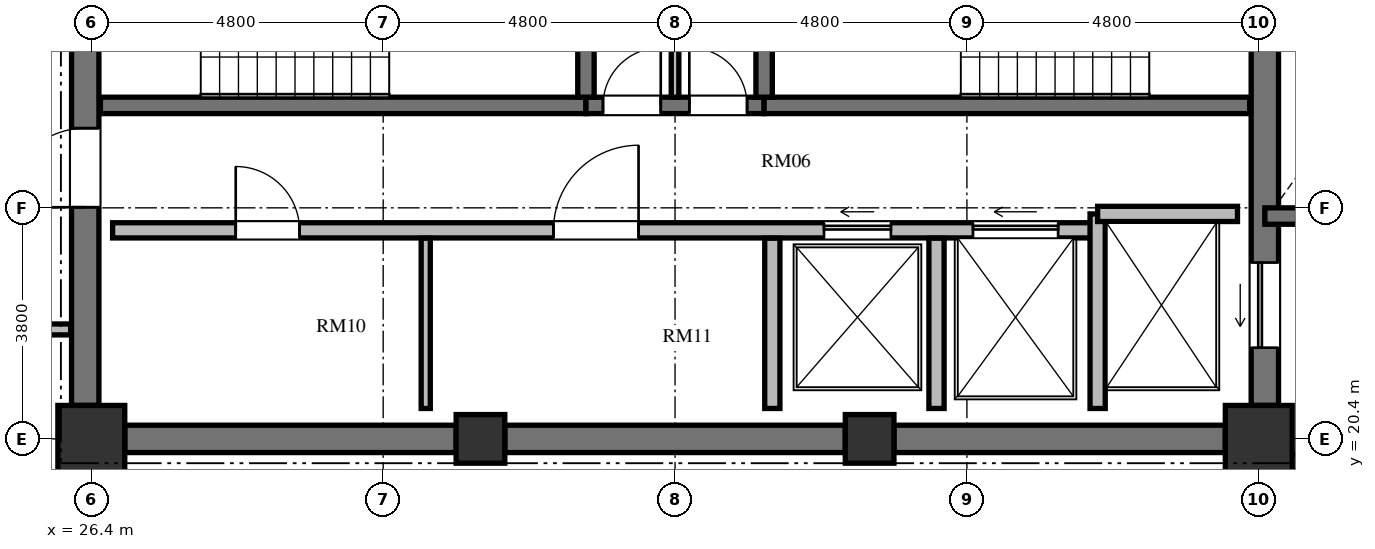
"""IFC4 building model, lengths in metres.
Left out: names, types, materials, properties, quantities, classifications, styles, units other than length and angle.
Written with IfcOpenShell. Run it as: python <this file> out.ifc"""

import sys

from ifc_helpers import new_model, si_unit, direction, frame, frame_2d, origin, origin_2d, place, context, subcontext, project, spatial, rectangle, extrude, element, fill, save


model = new_model("IFC4")
c1 = context("Model", 3, precision=1e-05, world=origin(), true_north=direction((0.0, 1.0)))
c2 = subcontext(c1, "Body", "Model", "MODEL_VIEW")
j1 = project(units=[si_unit("LENGTHUNIT", "METRE"), si_unit("PLANEANGLEUNIT", "RADIAN")], contexts=[c1])
p1 = place(None, origin())
s1 = spatial("IfcSite", under=j1, at=p1, CompositionType="ELEMENT")
p2 = place(p1, origin())
s2 = spatial("IfcBuilding", under=s1, at=p2, CompositionType="ELEMENT")
p3 = place(p2, frame((0.0, 0.0, 284.208)))
s3 = spatial("IfcBuildingStorey", under=s2, at=p3, CompositionType="ELEMENT", Elevation=284.208)
p4 = place(p3, frame((26.4, 20.4, 0.0), z_axis=(0.0, 0.0, 1.0), x_axis=(1.0, 0.0, 0.0)))
e1 = element("IfcColumn", 1, at=p4, inside=s3, PredefinedType="COLUMN", context=c2, shape_type="SweptSolid", body=[
    extrude(rectangle(XDim=1.1, YDim=1.1, at=origin_2d()), origin(), (0.0, 0.0, 1.0), 3.648),
])
for number, where, z_axis, x_axis in (
    (2, (32.8, 20.4, 0.0), (0.0, 0.0, 1.0), (1.0, 0.0, 0.0)),
    (3, (39.2, 20.4, 0.0), (0.0, 0.0, 1.0), (1.0, 0.0, 0.0)),
):
    element("IfcColumn", number, at=place(p3, frame(where, z_axis=z_axis, x_axis=x_axis)), inside=s3, PredefinedType="COLUMN", context=c2, shape_type="SweptSolid", body=[
        extrude(rectangle(XDim=0.8, YDim=0.8, at=origin_2d()), origin(), (0.0, 0.0, 1.0), 3.648),
    ])
p5 = place(p3, frame((45.6, 20.4, 0.0), z_axis=(0.0, 0.0, 1.0), x_axis=(1.0, 0.0, 0.0)))
e4 = element("IfcColumn", 4, at=p5, inside=s3, PredefinedType="COLUMN", context=c2, shape_type="SweptSolid", body=[
    extrude(rectangle(XDim=1.1, YDim=1.1, at=origin_2d()), origin(), (0.0, 0.0, 1.0), 3.648),
])
p6 = place(p3, frame((26.3, 20.95, 0.0), z_axis=(0.0, 0.0, 1.0), x_axis=(0.0, 1.0, 0.0)))
e5 = element("IfcWall", 5, at=p6, inside=s3, PredefinedType="SHEAR", context=c2, shape_type="SweptSolid", body=[
    extrude(rectangle(XDim=14.1, YDim=0.45, at=frame_2d((7.05, 0.0))), origin(), (0.0, 0.0, 1.0), 3.648),
])
p7 = place(p6, frame((6.5, 0.0, 0.0)))
e6 = element("IfcOpeningElement", 6, at=p7, cuts=e5, PredefinedType="OPENING", context=c2, shape_type="SweptSolid", body=[
    extrude(rectangle(XDim=1.2, YDim=2.15, at=frame_2d((0.6, 1.075))), frame((0.0, 0.235, 0.0), z_axis=(0.0, -1.0, 0.0), x_axis=(1.0, 0.0, 0.0)), (0.0, 0.0, 1.0), 0.47),
])
p8 = place(p6, frame((9.6, 0.0, 0.0)))
e7 = element("IfcOpeningElement", 7, at=p8, cuts=e5, PredefinedType="OPENING", context=c2, shape_type="SweptSolid", body=[
    extrude(rectangle(XDim=1.3, YDim=2.2, at=frame_2d((0.65, 1.1))), frame((0.0, 0.235, 0.0), z_axis=(0.0, -1.0, 0.0), x_axis=(1.0, 0.0, 0.0)), (0.0, 0.0, 1.0), 0.47),
])
p9 = place(p6, frame((3.26, 0.0, 0.0)))
e8 = element("IfcOpeningElement", 8, at=p9, cuts=e5, PredefinedType="OPENING", context=c2, shape_type="SweptSolid", body=[
    extrude(rectangle(XDim=1.3, YDim=2.2, at=frame_2d((0.65, 1.1))), frame((0.0, 0.235, 0.0), z_axis=(0.0, -1.0, 0.0), x_axis=(1.0, 0.0, 0.0)), (0.0, 0.0, 1.0), 0.47),
])
p10 = place(p3, frame((45.7, 20.95, 0.0), z_axis=(0.0, 0.0, 1.0), x_axis=(0.0, 1.0, 0.0)))
e9 = element("IfcWall", 9, at=p10, inside=s3, PredefinedType="SHEAR", context=c2, shape_type="SweptSolid", body=[
    extrude(rectangle(XDim=14.1, YDim=0.45, at=frame_2d((7.05, 0.0))), origin(), (0.0, 0.0, 1.0), 3.648),
])
p11 = place(p10, frame((11.75, 0.0, 0.0)))
e10 = element("IfcOpeningElement", 10, at=p11, cuts=e9, PredefinedType="OPENING", context=c2, shape_type="SweptSolid", body=[
    extrude(rectangle(XDim=1.4, YDim=2.3, at=frame_2d((0.7, 1.15))), frame((0.0, 0.235, 0.0), z_axis=(0.0, -1.0, 0.0), x_axis=(1.0, 0.0, 0.0)), (0.0, 0.0, 1.0), 0.47),
])
p12 = place(p10, frame((0.95, 0.0, 0.0)))
e11 = element("IfcOpeningElement", 11, at=p12, cuts=e9, PredefinedType="OPENING", context=c2, shape_type="SweptSolid", body=[
    extrude(rectangle(XDim=1.4, YDim=2.3, at=frame_2d((0.7, 1.15))), frame((0.0, 0.235, 0.0), z_axis=(0.0, -1.0, 0.0), x_axis=(1.0, 0.0, 0.0)), (0.0, 0.0, 1.0), 0.47),
])
p13 = place(p3, frame((26.95, 20.4, 0.0), z_axis=(0.0, 0.0, 1.0), x_axis=(1.0, 0.0, 0.0)))
e12 = element("IfcWall", 12, at=p13, inside=s3, PredefinedType="SHEAR", context=c2, shape_type="SweptSolid", body=[
    extrude(rectangle(XDim=5.45, YDim=0.45, at=frame_2d((2.725, 0.0))), origin(), (0.0, 0.0, 1.0), 3.648),
])
p14 = place(p3, frame((33.2, 20.4, 0.0), z_axis=(0.0, 0.0, 1.0), x_axis=(1.0, 0.0, 0.0)))
e13 = element("IfcWall", 13, at=p14, inside=s3, PredefinedType="SHEAR", context=c2, shape_type="SweptSolid", body=[
    extrude(rectangle(XDim=5.6, YDim=0.45, at=frame_2d((2.8, 0.0))), origin(), (0.0, 0.0, 1.0), 3.648),
])
p15 = place(p3, frame((39.6, 20.4, 0.0), z_axis=(0.0, 0.0, 1.0), x_axis=(1.0, 0.0, 0.0)))
e14 = element("IfcWall", 14, at=p15, inside=s3, PredefinedType="SHEAR", context=c2, shape_type="SweptSolid", body=[
    extrude(rectangle(XDim=5.45, YDim=0.45, at=frame_2d((2.725, 0.0))), origin(), (0.0, 0.0, 1.0), 3.648),
])
p16 = place(p3, frame((26.55, 25.885, 0.0), z_axis=(0.0, 0.0, 1.0), x_axis=(1.0, 0.0, 0.0)))
e15 = element("IfcWall", 15, at=p16, inside=s3, PredefinedType="SHEAR", context=c2, shape_type="SweptSolid", body=[
    extrude(rectangle(XDim=7.985, YDim=0.27, at=frame_2d((3.992, 0.0))), origin(), (0.0, 0.0, 1.0), 3.648),
])
p17 = place(p3, frame((34.535, 25.885, 0.0), z_axis=(0.0, 0.0, 1.0), x_axis=(1.0, 0.0, 0.0)))
e16 = element("IfcWall", 16, at=p17, inside=s3, PredefinedType="SHEAR", context=c2, shape_type="SweptSolid", body=[
    extrude(rectangle(XDim=2.93, YDim=0.27, at=frame_2d((1.465, 0.0))), origin(), (0.0, 0.0, 1.0), 3.648),
])
p18 = place(p17, frame((0.28, 0.0, 0.0)))
e17 = element("IfcOpeningElement", 17, at=p18, cuts=e16, PredefinedType="OPENING", context=c2, shape_type="SweptSolid", body=[
    extrude(rectangle(XDim=0.95, YDim=2.1, at=frame_2d((0.475, 1.05))), frame((0.0, 0.145, 0.0), z_axis=(0.0, -1.0, 0.0), x_axis=(1.0, 0.0, 0.0)), (0.0, 0.0, 1.0), 0.29),
])
p19 = place(p17, frame((1.7, 0.0, 0.0)))
e18 = element("IfcOpeningElement", 18, at=p19, cuts=e16, PredefinedType="OPENING", context=c2, shape_type="SweptSolid", body=[
    extrude(rectangle(XDim=0.95, YDim=2.1, at=frame_2d((0.475, 1.05))), frame((0.0, 0.145, 0.0), z_axis=(0.0, -1.0, 0.0), x_axis=(1.0, 0.0, 0.0)), (0.0, 0.0, 1.0), 0.29),
])
p20 = place(p3, frame((37.465, 25.885, 0.0), z_axis=(0.0, 0.0, 1.0), x_axis=(1.0, 0.0, 0.0)))
e19 = element("IfcWall", 19, at=p20, inside=s3, PredefinedType="SHEAR", context=c2, shape_type="SweptSolid", body=[
    extrude(rectangle(XDim=7.985, YDim=0.27, at=frame_2d((3.992, 0.0))), origin(), (0.0, 0.0, 1.0), 3.648),
])
for number, where, z_axis, x_axis in (
    (20, (34.535, 26.02, 0.0), (0.0, 0.0, 1.0), (0.0, 1.0, 0.0)),
    (21, (37.465, 26.02, 0.0), (0.0, 0.0, 1.0), (0.0, 1.0, 0.0)),
):
    element("IfcWall", number, at=place(p3, frame(where, z_axis=z_axis, x_axis=x_axis)), inside=s3, PredefinedType="SHEAR", context=c2, shape_type="SweptSolid", body=[
        extrude(rectangle(XDim=4.08, YDim=0.27, at=frame_2d((2.04, 0.0))), origin(), (0.0, 0.0, 1.0), 3.648),
    ])
p21 = place(p3, frame((36.0, 26.02, 0.0), z_axis=(0.0, 0.0, 1.0), x_axis=(0.0, 1.0, 0.0)))
e22 = element("IfcWall", 22, at=p21, inside=s3, PredefinedType="PARTITIONING", context=c2, shape_type="SweptSolid", body=[
    extrude(rectangle(XDim=4.08, YDim=0.125, at=frame_2d((2.04, 0.0))), origin(), (0.0, 0.0, 1.0), 3.448),
])
p22 = place(p3, frame((26.75, 23.83, 0.0), z_axis=(0.0, 0.0, 1.0), x_axis=(1.0, 0.0, 0.0)))
e23 = element("IfcWall", 23, at=p22, inside=s3, PredefinedType="SOLIDWALL", context=c2, shape_type="SweptSolid", body=[
    extrude(rectangle(XDim=16.2, YDim=0.25, at=frame_2d((8.1, 0.0))), origin(), (0.0, 0.0, 1.0), 3.448),
])
p23 = place(p22, frame((2.025, 0.0, 0.0)))
e24 = element("IfcOpeningElement", 24, at=p23, cuts=e23, PredefinedType="OPENING", context=c2, shape_type="SweptSolid", body=[
    extrude(rectangle(XDim=1.05, YDim=2.15, at=frame_2d((0.525, 1.075))), frame((0.0, 0.135, 0.0), z_axis=(0.0, -1.0, 0.0), x_axis=(1.0, 0.0, 0.0)), (0.0, 0.0, 1.0), 0.27),
])
p24 = place(p22, frame((7.25, 0.0, 0.0)))
e25 = element("IfcOpeningElement", 25, at=p24, cuts=e23, PredefinedType="OPENING", context=c2, shape_type="SweptSolid", body=[
    extrude(rectangle(XDim=1.4, YDim=2.2, at=frame_2d((0.7, 1.1))), frame((0.0, 0.135, 0.0), z_axis=(0.0, -1.0, 0.0), x_axis=(1.0, 0.0, 0.0)), (0.0, 0.0, 1.0), 0.27),
])
p25 = place(p22, frame((11.7, 0.0, 0.0)))
e26 = element("IfcOpeningElement", 26, at=p25, cuts=e23, PredefinedType="OPENING", context=c2, shape_type="SweptSolid", body=[
    extrude(rectangle(XDim=1.1, YDim=2.2, at=frame_2d((0.55, 1.1))), frame((0.0, 0.135, 0.0), z_axis=(0.0, -1.0, 0.0), x_axis=(1.0, 0.0, 0.0)), (0.0, 0.0, 1.0), 0.27),
])
p26 = place(p22, frame((14.15, 0.0, 0.0)))
e27 = element("IfcOpeningElement", 27, at=p26, cuts=e23, PredefinedType="OPENING", context=c2, shape_type="SweptSolid", body=[
    extrude(rectangle(XDim=1.4, YDim=2.3, at=frame_2d((0.7, 1.15))), frame((0.0, 0.135, 0.0), z_axis=(0.0, -1.0, 0.0), x_axis=(1.0, 0.0, 0.0)), (0.0, 0.0, 1.0), 0.27),
])
p27 = place(p3, frame((42.95, 20.9, 0.0), z_axis=(0.0, 0.0, 1.0), x_axis=(0.0, 1.0, 0.0)))
e28 = element("IfcWall", 28, at=p27, inside=s3, PredefinedType="SOLIDWALL", context=c2, shape_type="SweptSolid", body=[
    extrude(rectangle(XDim=3.2, YDim=0.25, at=frame_2d((1.6, 0.0))), origin(), (0.0, 0.0, 1.0), 3.448),
])
p28 = place(p3, frame((42.95, 24.1, 0.0), z_axis=(0.0, 0.0, 1.0), x_axis=(1.0, 0.0, 0.0)))
e29 = element("IfcWall", 29, at=p28, inside=s3, PredefinedType="SOLIDWALL", context=c2, shape_type="SweptSolid", body=[
    extrude(rectangle(XDim=2.3, YDim=0.25, at=frame_2d((1.15, 0.0))), origin(), (0.0, 0.0, 1.0), 3.448),
])
for number, where, z_axis, x_axis in (
    (30, (37.6, 20.9, 0.0), (0.0, 0.0, 1.0), (0.0, 1.0, 0.0)),
    (31, (40.3, 20.9, 0.0), (0.0, 0.0, 1.0), (0.0, 1.0, 0.0)),
):
    element("IfcWall", number, at=place(p3, frame(where, z_axis=z_axis, x_axis=x_axis)), inside=s3, PredefinedType="SOLIDWALL", context=c2, shape_type="SweptSolid", body=[
        extrude(rectangle(XDim=2.8, YDim=0.25, at=frame_2d((1.4, 0.0))), origin(), (0.0, 0.0, 1.0), 3.448),
    ])
p29 = place(p3, frame((31.9, 20.9, 0.0), z_axis=(0.0, 0.0, 1.0), x_axis=(0.0, 1.0, 0.0)))
e32 = element("IfcWall", 32, at=p29, inside=s3, PredefinedType="PARTITIONING", context=c2, shape_type="SweptSolid", body=[
    extrude(rectangle(XDim=2.8, YDim=0.15, at=frame_2d((1.4, 0.0))), origin(), (0.0, 0.0, 1.0), 3.448),
])
p30 = place(p3, frame((45.7, 24.065, 0.0), z_axis=(0.0, 0.0, 1.0), x_axis=(1.0, 0.0, 0.0)))
e33 = element("IfcWall", 33, at=p30, inside=s3, PredefinedType="SHEAR", context=c2, shape_type="SweptSolid", body=[
    extrude(rectangle(XDim=4.715, YDim=0.27, at=frame_2d((2.357, 0.0))), origin(), (0.0, 0.0, 1.0), 3.648),
])
p31 = place(p3, frame((45.7, 20.02, 0.0), z_axis=(0.0, 0.0, 1.0), x_axis=(1.0, 0.0, 0.0)))
e34 = element("IfcWall", 34, at=p31, inside=s3, PredefinedType="SOLIDWALL", context=c2, shape_type="SweptSolid", body=[
    extrude(rectangle(XDim=4.715, YDim=0.25, at=frame_2d((2.357, 0.0))), origin(), (0.0, 0.0, 1.0), 3.448),
])
p32 = place(p3, frame((26.06, 22.2, 0.0), z_axis=(0.0, 0.0, 1.0), x_axis=(-1.0, 0.0, 0.0)))
e35 = element("IfcWall", 35, at=p32, inside=s3, PredefinedType="PARTITIONING", context=c2, shape_type="SweptSolid", body=[
    extrude(rectangle(XDim=2.35, YDim=0.18, at=frame_2d((1.175, 0.0))), origin(), (0.0, 0.0, 1.0), 3.448),
])
p33 = place(p18, origin())
e36 = element("IfcDoor", 36, at=p33, inside=s3, OperationType="SINGLE_SWING_RIGHT", PredefinedType="DOOR", context=c2, shape_type="SweptSolid", body=[
    extrude(rectangle(XDim=0.95, YDim=2.1, at=frame_2d((0.475, 1.05))), frame((0.0, 0.025, 0.0), z_axis=(0.0, -1.0, 0.0), x_axis=(1.0, 0.0, 0.0)), (0.0, 0.0, 1.0), 0.05),
])
fill(e17, e36)
p34 = place(p19, origin())
e37 = element("IfcDoor", 37, at=p34, inside=s3, OperationType="SINGLE_SWING_LEFT", PredefinedType="DOOR", context=c2, shape_type="SweptSolid", body=[
    extrude(rectangle(XDim=0.95, YDim=2.1, at=frame_2d((0.475, 1.05))), frame((0.0, 0.025, 0.0), z_axis=(0.0, -1.0, 0.0), x_axis=(1.0, 0.0, 0.0)), (0.0, 0.0, 1.0), 0.05),
])
fill(e18, e37)
p35 = place(p9, origin())
e38 = element("IfcDoor", 38, at=p35, inside=s3, OperationType="SINGLE_SWING_LEFT", PredefinedType="DOOR", context=c2, shape_type="SweptSolid", body=[
    extrude(rectangle(XDim=1.3, YDim=2.2, at=frame_2d((0.65, 1.1))), frame((0.0, 0.025, 0.0), z_axis=(0.0, -1.0, 0.0), x_axis=(1.0, 0.0, 0.0)), (0.0, 0.0, 1.0), 0.05),
])
fill(e8, e38)
p36 = place(p23, origin())
e39 = element("IfcDoor", 39, at=p36, inside=s3, OperationType="SINGLE_SWING_LEFT", PredefinedType="DOOR", context=c2, shape_type="SweptSolid", body=[
    extrude(rectangle(XDim=1.05, YDim=2.15, at=frame_2d((0.525, 1.075))), frame((0.0, 0.025, 0.0), z_axis=(0.0, -1.0, 0.0), x_axis=(1.0, 0.0, 0.0)), (0.0, 0.0, 1.0), 0.05),
])
fill(e24, e39)
p37 = place(p24, origin())
e40 = element("IfcDoor", 40, at=p37, inside=s3, OperationType="SINGLE_SWING_RIGHT", PredefinedType="DOOR", context=c2, shape_type="SweptSolid", body=[
    extrude(rectangle(XDim=1.4, YDim=2.2, at=frame_2d((0.7, 1.1))), frame((0.0, 0.025, 0.0), z_axis=(0.0, -1.0, 0.0), x_axis=(1.0, 0.0, 0.0)), (0.0, 0.0, 1.0), 0.05),
])
fill(e25, e40)
p38 = place(p25, origin())
e41 = element("IfcDoor", 41, at=p38, inside=s3, OperationType="SLIDING_TO_LEFT", PredefinedType="DOOR", context=c2, shape_type="SweptSolid", body=[
    extrude(rectangle(XDim=1.1, YDim=2.2, at=frame_2d((0.55, 1.1))), frame((0.0, 0.025, 0.0), z_axis=(0.0, -1.0, 0.0), x_axis=(1.0, 0.0, 0.0)), (0.0, 0.0, 1.0), 0.05),
])
fill(e26, e41)
p39 = place(p12, origin())
e42 = element("IfcDoor", 42, at=p39, inside=s3, OperationType="SLIDING_TO_LEFT", PredefinedType="DOOR", context=c2, shape_type="SweptSolid", body=[
    extrude(rectangle(XDim=1.4, YDim=2.3, at=frame_2d((0.7, 1.15))), frame((0.0, 0.025, 0.0), z_axis=(0.0, -1.0, 0.0), x_axis=(1.0, 0.0, 0.0)), (0.0, 0.0, 1.0), 0.05),
])
fill(e11, e42)
p40 = place(p26, origin())
e43 = element("IfcDoor", 43, at=p40, inside=s3, OperationType="SLIDING_TO_LEFT", PredefinedType="DOOR", context=c2, shape_type="SweptSolid", body=[
    extrude(rectangle(XDim=1.4, YDim=2.3, at=frame_2d((0.7, 1.15))), frame((0.0, 0.025, 0.0), z_axis=(0.0, -1.0, 0.0), x_axis=(1.0, 0.0, 0.0)), (0.0, 0.0, 1.0), 0.05),
])
fill(e27, e43)
save(model, sys.argv[1])
